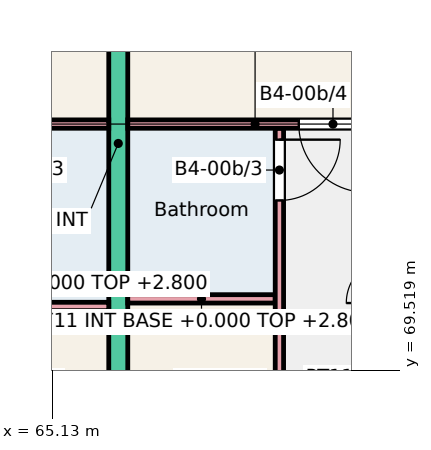
"""IFC4 building model, lengths in metres.
Left out: names, types, materials, properties, quantities, classifications, styles, units other than length and angle.
Written with IfcOpenShell. Run it as: python <this file> out.ifc"""

import sys

from ifc_helpers import new_model, si_unit, direction, frame, frame_2d, origin, place, context, subcontext, project, spatial, rectangle, extrude, element, fill, save


model = new_model("IFC4")
c1 = context("Model", 3, precision=1e-05, world=origin(), true_north=direction((0.0, 1.0)))
c2 = subcontext(c1, "Body", "Model", "MODEL_VIEW")
j1 = project(units=[si_unit("LENGTHUNIT", "METRE"), si_unit("PLANEANGLEUNIT", "RADIAN")], contexts=[c1])
p1 = place(None, origin())
s1 = spatial("IfcSite", under=j1, at=p1, CompositionType="ELEMENT")
p2 = place(p1, origin())
s2 = spatial("IfcBuilding", under=s1, at=p2, CompositionType="ELEMENT")
p3 = place(p2, origin())
s3 = spatial("IfcBuildingStorey", under=s2, at=p3, CompositionType="ELEMENT", Elevation=0.0)
p4 = place(p3, frame((66.0, 68.0, -0.25), z_axis=(0.0, 0.0, 1.0), x_axis=(0.0, 1.0, 0.0)))
e1 = element("IfcWall", 1, at=p4, inside=s3, PredefinedType="SHEAR", context=c2, shape_type="SweptSolid", body=[
    extrude(rectangle(XDim=9.0, YDim=0.25, at=frame_2d((4.5, 0.0))), origin(), (0.0, 0.0, 1.0), 3.25),
])
p5 = place(p3, frame((63.96, 70.355, 0.0), z_axis=(0.0, 0.0, 1.0), x_axis=(1.0, 0.0, 0.0)))
e2 = element("IfcWall", 2, at=p5, inside=s3, PredefinedType="PARTITIONING", context=c2, shape_type="SweptSolid", body=[
    extrude(rectangle(XDim=1.915, YDim=0.11, at=frame_2d((0.958, 0.0))), origin(), (0.0, 0.0, 1.0), 2.8),
])
p6 = place(p3, frame((62.55, 72.755, 0.0), z_axis=(0.0, 0.0, 1.0), x_axis=(1.0, 0.0, 0.0)))
e3 = element("IfcWall", 3, at=p6, inside=s3, PredefinedType="PARTITIONING", context=c2, shape_type="SweptSolid", body=[
    extrude(rectangle(XDim=3.325, YDim=0.11, at=frame_2d((1.663, 0.0))), origin(), (0.0, 0.0, 1.0), 2.8),
])
p7 = place(p6, frame((0.2, 0.0, 0.0)))
e4 = element("IfcOpeningElement", 4, at=p7, cuts=e3, PredefinedType="OPENING", context=c2, shape_type="SweptSolid", body=[
    extrude(rectangle(XDim=0.9, YDim=2.1, at=frame_2d((0.45, 1.05))), frame((0.0, 0.065, 0.0), z_axis=(0.0, -1.0, 0.0), x_axis=(1.0, 0.0, 0.0)), (0.0, 0.0, 1.0), 0.13),
])
p8 = place(p3, frame((66.125, 70.455, 0.0), z_axis=(0.0, 0.0, 1.0), x_axis=(1.0, 0.0, 0.0)))
e5 = element("IfcWall", 5, at=p8, inside=s3, PredefinedType="PARTITIONING", context=c2, shape_type="SweptSolid", body=[
    extrude(rectangle(XDim=1.94, YDim=0.11, at=frame_2d((0.97, 0.0))), origin(), (0.0, 0.0, 1.0), 2.8),
])
p9 = place(p3, frame((68.12, 68.0, 0.0), z_axis=(0.0, 0.0, 1.0), x_axis=(0.0, 1.0, 0.0)))
e6 = element("IfcWall", 6, at=p9, inside=s3, PredefinedType="PARTITIONING", context=c2, shape_type="SweptSolid", body=[
    extrude(rectangle(XDim=4.7, YDim=0.11, at=frame_2d((2.35, 0.0))), origin(), (0.0, 0.0, 1.0), 2.8),
])
p10 = place(p9, frame((0.2, 0.0, 0.0)))
e7 = element("IfcOpeningElement", 7, at=p10, cuts=e6, PredefinedType="OPENING", context=c2, shape_type="SweptSolid", body=[
    extrude(rectangle(XDim=0.8, YDim=2.1, at=frame_2d((0.4, 1.05))), frame((0.0, 0.065, 0.0), z_axis=(0.0, -1.0, 0.0), x_axis=(1.0, 0.0, 0.0)), (0.0, 0.0, 1.0), 0.13),
])
p11 = place(p9, frame((3.75, 0.0, 0.0)))
e8 = element("IfcOpeningElement", 8, at=p11, cuts=e6, PredefinedType="OPENING", context=c2, shape_type="SweptSolid", body=[
    extrude(rectangle(XDim=0.8, YDim=2.1, at=frame_2d((0.4, 1.05))), frame((0.0, 0.065, 0.0), z_axis=(0.0, -1.0, 0.0), x_axis=(1.0, 0.0, 0.0)), (0.0, 0.0, 1.0), 0.13),
])
p12 = place(p3, frame((66.125, 72.755, 0.0), z_axis=(0.0, 0.0, 1.0), x_axis=(1.0, 0.0, 0.0)))
e9 = element("IfcWall", 9, at=p12, inside=s3, PredefinedType="PARTITIONING", context=c2, shape_type="SweptSolid", body=[
    extrude(rectangle(XDim=3.35, YDim=0.11, at=frame_2d((1.675, 0.0))), origin(), (0.0, 0.0, 1.0), 2.8),
])
p13 = place(p12, frame((2.25, 0.0, 0.0)))
e10 = element("IfcOpeningElement", 10, at=p13, cuts=e9, PredefinedType="OPENING", context=c2, shape_type="SweptSolid", body=[
    extrude(rectangle(XDim=0.9, YDim=2.1, at=frame_2d((0.45, 1.05))), frame((0.0, 0.065, 0.0), z_axis=(0.0, -1.0, 0.0), x_axis=(1.0, 0.0, 0.0)), (0.0, 0.0, 1.0), 0.13),
])
p14 = place(p11, origin())
e11 = element("IfcDoor", 11, at=p14, inside=s3, OperationType="SINGLE_SWING_RIGHT", PredefinedType="DOOR", context=c2, shape_type="SweptSolid", body=[
    extrude(rectangle(XDim=0.8, YDim=2.1, at=frame_2d((0.4, 1.05))), frame((0.0, 0.025, 0.0), z_axis=(0.0, -1.0, 0.0), x_axis=(1.0, 0.0, 0.0)), (0.0, 0.0, 1.0), 0.05),
])
fill(e8, e11)
p15 = place(p13, origin())
e12 = element("IfcDoor", 12, at=p15, inside=s3, OperationType="SINGLE_SWING_RIGHT", PredefinedType="DOOR", context=c2, shape_type="SweptSolid", body=[
    extrude(rectangle(XDim=0.9, YDim=2.1, at=frame_2d((0.45, 1.05))), frame((0.0, 0.025, 0.0), z_axis=(0.0, -1.0, 0.0), x_axis=(1.0, 0.0, 0.0)), (0.0, 0.0, 1.0), 0.05),
])
fill(e10, e12)
save(model, sys.argv[1])
